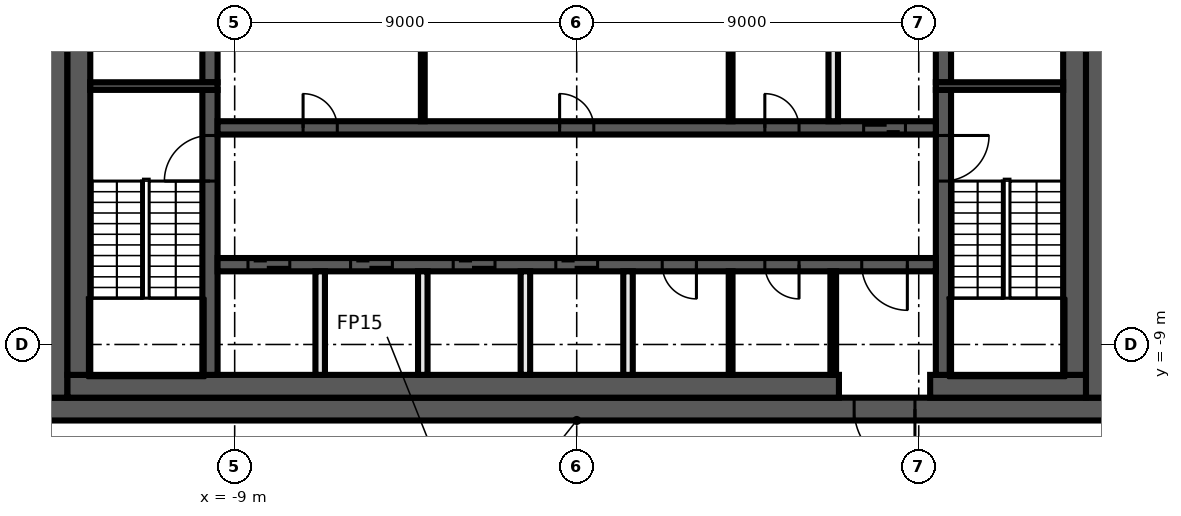
"""IFC4 building model, lengths in metres.
Left out: names, types, materials, properties, quantities, classifications, styles, units other than length and angle.
Written with IfcOpenShell. Run it as: python <this file> out.ifc"""

import sys

from ifc_helpers import new_model, si_unit, direction, frame, frame_2d, origin, place, context, subcontext, project, spatial, rectangle, extrude, element, fill, save


model = new_model("IFC4")
c1 = context("Model", 3, precision=1e-05, world=origin(), true_north=direction((0.0, 1.0)))
c2 = subcontext(c1, "Body", "Model", "MODEL_VIEW")
j1 = project(units=[si_unit("LENGTHUNIT", "METRE"), si_unit("PLANEANGLEUNIT", "RADIAN")], contexts=[c1])
p1 = place(None, origin())
s1 = spatial("IfcSite", under=j1, at=p1, CompositionType="ELEMENT")
p2 = place(p1, origin())
s2 = spatial("IfcBuilding", under=s1, at=p2, CompositionType="ELEMENT")
p3 = place(p2, frame((0.0, 0.0, 344.6)))
s3 = spatial("IfcBuildingStorey", under=s2, at=p3, CompositionType="ELEMENT", Elevation=344.6)
p4 = place(p3, frame((14.0, -10.7, 0.0), z_axis=(0.0, 0.0, 1.0), x_axis=(-1.0, 0.0, 0.0)))
e1 = element("IfcWall", 1, at=p4, inside=s3, PredefinedType="SHEAR", context=c2, shape_type="SweptSolid", body=[
    extrude(rectangle(XDim=28.0, YDim=0.6, at=frame_2d((14.0, 0.0))), origin(), (0.0, 0.0, 1.0), 3.82),
])
p5 = place(p4, frame((5.1, 0.0, 0.0)))
e2 = element("IfcOpeningElement", 2, at=p5, cuts=e1, PredefinedType="OPENING", context=c2, shape_type="SweptSolid", body=[
    extrude(rectangle(XDim=1.6, YDim=2.1, at=frame_2d((0.8, 1.05))), frame((0.0, 0.31, 0.0), z_axis=(0.0, -1.0, 0.0), x_axis=(1.0, 0.0, 0.0)), (0.0, 0.0, 1.0), 0.62),
])
for number, where, z_axis, x_axis in (
    (3, (13.7, 10.4, 0.0), (0.0, 0.0, 1.0), (0.0, -1.0, 0.0)),
    (4, (-13.7, -10.4, 0.0), (0.0, 0.0, 1.0), (0.0, 1.0, 0.0)),
):
    element("IfcWall", number, at=place(p3, frame(where, z_axis=z_axis, x_axis=x_axis)), inside=s3, PredefinedType="SHEAR", context=c2, shape_type="SweptSolid", body=[
        extrude(rectangle(XDim=20.8, YDim=0.6, at=frame_2d((10.4, 0.0))), origin(), (0.0, 0.0, 1.0), 3.82),
    ])
p6 = place(p3, frame((13.4, -10.1, 0.0), z_axis=(0.0, 0.0, 1.0), x_axis=(-1.0, 0.0, 0.0)))
e5 = element("IfcWall", 5, at=p6, inside=s3, PredefinedType="SHEAR", context=c2, shape_type="SweptSolid", body=[
    extrude(rectangle(XDim=4.1, YDim=0.6, at=frame_2d((2.05, 0.0))), origin(), (0.0, 0.0, 1.0), 3.82),
])
p7 = place(p3, frame((6.9, -10.1, 0.0), z_axis=(0.0, 0.0, 1.0), x_axis=(-1.0, 0.0, 0.0)))
e6 = element("IfcWall", 6, at=p7, inside=s3, PredefinedType="SHEAR", context=c2, shape_type="SweptSolid", body=[
    extrude(rectangle(XDim=20.3, YDim=0.6, at=frame_2d((10.15, 0.0))), origin(), (0.0, 0.0, 1.0), 3.82),
])
for number, where, z_axis, x_axis in (
    (7, (13.1, 9.8, 0.0), (0.0, 0.0, 1.0), (0.0, -1.0, 0.0)),
    (8, (-13.1, -9.8, 0.0), (0.0, 0.0, 1.0), (0.0, 1.0, 0.0)),
):
    element("IfcWall", number, at=place(p3, frame(where, z_axis=z_axis, x_axis=x_axis)), inside=s3, PredefinedType="SHEAR", context=c2, shape_type="SweptSolid", body=[
        extrude(rectangle(XDim=19.6, YDim=0.6, at=frame_2d((9.8, 0.0))), origin(), (0.0, 0.0, 1.0), 3.82),
    ])
p8 = place(p3, frame((9.65, -2.3, 0.0), z_axis=(0.0, 0.0, 1.0), x_axis=(0.0, -1.0, 0.0)))
e9 = element("IfcWall", 9, at=p8, inside=s3, PredefinedType="SHEAR", context=c2, shape_type="SweptSolid", body=[
    extrude(rectangle(XDim=7.5, YDim=0.4, at=frame_2d((3.75, 0.0))), origin(), (0.0, 0.0, 1.0), 3.82),
])
p9 = place(p8, frame((1.2, 0.0, 0.0)))
e10 = element("IfcOpeningElement", 10, at=p9, cuts=e9, PredefinedType="OPENING", context=c2, shape_type="SweptSolid", body=[
    extrude(rectangle(XDim=1.2, YDim=2.1, at=frame_2d((0.6, 1.05))), frame((0.0, 0.21, 0.0), z_axis=(0.0, -1.0, 0.0), x_axis=(1.0, 0.0, 0.0)), (0.0, 0.0, 1.0), 0.42),
])
p10 = place(p3, frame((9.65, 2.1, 0.0), z_axis=(0.0, 0.0, 1.0), x_axis=(0.0, -1.0, 0.0)))
e11 = element("IfcWall", 11, at=p10, inside=s3, PredefinedType="SHEAR", context=c2, shape_type="SweptSolid", body=[
    extrude(rectangle(XDim=4.2, YDim=0.4, at=frame_2d((2.1, 0.0))), origin(), (0.0, 0.0, 1.0), 3.82),
])
p11 = place(p10, frame((0.15, 0.0, 0.0)))
e12 = element("IfcOpeningElement", 12, at=p11, cuts=e11, PredefinedType="OPENING", context=c2, shape_type="SweptSolid", body=[
    extrude(rectangle(XDim=0.9, YDim=2.1, at=frame_2d((0.45, 1.05))), frame((0.0, 0.21, 0.0), z_axis=(0.0, -1.0, 0.0), x_axis=(1.0, 0.0, 0.0)), (0.0, 0.0, 1.0), 0.42),
])
p12 = place(p3, frame((-9.65, -9.8, 0.0), z_axis=(0.0, 0.0, 1.0), x_axis=(0.0, 1.0, 0.0)))
e13 = element("IfcWall", 13, at=p12, inside=s3, PredefinedType="SHEAR", context=c2, shape_type="SweptSolid", body=[
    extrude(rectangle(XDim=7.5, YDim=0.4, at=frame_2d((3.75, 0.0))), origin(), (0.0, 0.0, 1.0), 3.82),
])
p13 = place(p12, frame((5.1, 0.0, 0.0)))
e14 = element("IfcOpeningElement", 14, at=p13, cuts=e13, PredefinedType="OPENING", context=c2, shape_type="SweptSolid", body=[
    extrude(rectangle(XDim=1.2, YDim=2.1, at=frame_2d((0.6, 1.05))), frame((0.0, 0.21, 0.0), z_axis=(0.0, -1.0, 0.0), x_axis=(1.0, 0.0, 0.0)), (0.0, 0.0, 1.0), 0.42),
])
p14 = place(p3, frame((-9.65, -2.1, 0.0), z_axis=(0.0, 0.0, 1.0), x_axis=(0.0, 1.0, 0.0)))
e15 = element("IfcWall", 15, at=p14, inside=s3, PredefinedType="SHEAR", context=c2, shape_type="SweptSolid", body=[
    extrude(rectangle(XDim=4.2, YDim=0.4, at=frame_2d((2.1, 0.0))), origin(), (0.0, 0.0, 1.0), 3.82),
])
for number, where, z_axis, x_axis in (
    (16, (9.45, -2.2, 0.0), (0.0, 0.0, 1.0), (1.0, 0.0, 0.0)),
    (17, (-9.45, -2.2, 0.0), (0.0, 0.0, 1.0), (-1.0, 0.0, 0.0)),
):
    element("IfcWall", number, at=place(p3, frame(where, z_axis=z_axis, x_axis=x_axis)), inside=s3, PredefinedType="SHEAR", context=c2, shape_type="SweptSolid", body=[
        extrude(rectangle(XDim=3.35, YDim=0.2, at=frame_2d((1.675, 0.0))), origin(), (0.0, 0.0, 1.0), 3.82),
    ])
p15 = place(p3, frame((-9.45, -3.3, 0.0), z_axis=(0.0, 0.0, 1.0), x_axis=(1.0, 0.0, 0.0)))
e18 = element("IfcWall", 18, at=p15, inside=s3, PredefinedType="SHEAR", context=c2, shape_type="SweptSolid", body=[
    extrude(rectangle(XDim=18.9, YDim=0.35, at=frame_2d((9.45, 0.0))), origin(), (0.0, 0.0, 1.0), 3.82),
])
p16 = place(p15, frame((17.0, 0.0, 0.0)))
e19 = element("IfcOpeningElement", 19, at=p16, cuts=e18, PredefinedType="OPENING", context=c2, shape_type="SweptSolid", body=[
    extrude(rectangle(XDim=1.1, YDim=2.1, at=frame_2d((0.55, 1.05))), frame((0.0, 0.185, 0.0), z_axis=(0.0, -1.0, 0.0), x_axis=(1.0, 0.0, 0.0)), (0.0, 0.0, 1.0), 0.37),
])
p17 = place(p15, frame((2.25, 0.0, 0.0)))
e20 = element("IfcOpeningElement", 20, at=p17, cuts=e18, PredefinedType="OPENING", context=c2, shape_type="SweptSolid", body=[
    extrude(rectangle(XDim=0.9, YDim=2.1, at=frame_2d((0.45, 1.05))), frame((0.0, 0.185, 0.0), z_axis=(0.0, -1.0, 0.0), x_axis=(1.0, 0.0, 0.0)), (0.0, 0.0, 1.0), 0.37),
])
p18 = place(p15, frame((9.0, 0.0, 0.0)))
e21 = element("IfcOpeningElement", 21, at=p18, cuts=e18, PredefinedType="OPENING", context=c2, shape_type="SweptSolid", body=[
    extrude(rectangle(XDim=0.9, YDim=2.1, at=frame_2d((0.45, 1.05))), frame((0.0, 0.185, 0.0), z_axis=(0.0, -1.0, 0.0), x_axis=(1.0, 0.0, 0.0)), (0.0, 0.0, 1.0), 0.37),
])
p19 = place(p15, frame((14.4, 0.0, 0.0)))
e22 = element("IfcOpeningElement", 22, at=p19, cuts=e18, PredefinedType="OPENING", context=c2, shape_type="SweptSolid", body=[
    extrude(rectangle(XDim=0.9, YDim=2.1, at=frame_2d((0.45, 1.05))), frame((0.0, 0.185, 0.0), z_axis=(0.0, -1.0, 0.0), x_axis=(1.0, 0.0, 0.0)), (0.0, 0.0, 1.0), 0.37),
])
p20 = place(p3, frame((9.45, -6.9, 0.0), z_axis=(0.0, 0.0, 1.0), x_axis=(-1.0, 0.0, 0.0)))
e23 = element("IfcWall", 23, at=p20, inside=s3, PredefinedType="SHEAR", context=c2, shape_type="SweptSolid", body=[
    extrude(rectangle(XDim=18.9, YDim=0.35, at=frame_2d((9.45, 0.0))), origin(), (0.0, 0.0, 1.0), 3.82),
])
p21 = place(p20, frame((17.0, 0.0, 0.0)))
e24 = element("IfcOpeningElement", 24, at=p21, cuts=e23, PredefinedType="OPENING", context=c2, shape_type="SweptSolid", body=[
    extrude(rectangle(XDim=1.1, YDim=2.1, at=frame_2d((0.55, 1.05))), frame((0.0, 0.185, 0.0), z_axis=(0.0, -1.0, 0.0), x_axis=(1.0, 0.0, 0.0)), (0.0, 0.0, 1.0), 0.37),
])
p22 = place(p20, frame((14.3, 0.0, 0.0)))
e25 = element("IfcOpeningElement", 25, at=p22, cuts=e23, PredefinedType="OPENING", context=c2, shape_type="SweptSolid", body=[
    extrude(rectangle(XDim=1.1, YDim=2.1, at=frame_2d((0.55, 1.05))), frame((0.0, 0.185, 0.0), z_axis=(0.0, -1.0, 0.0), x_axis=(1.0, 0.0, 0.0)), (0.0, 0.0, 1.0), 0.37),
])
p23 = place(p20, frame((11.6, 0.0, 0.0)))
e26 = element("IfcOpeningElement", 26, at=p23, cuts=e23, PredefinedType="OPENING", context=c2, shape_type="SweptSolid", body=[
    extrude(rectangle(XDim=1.1, YDim=2.1, at=frame_2d((0.55, 1.05))), frame((0.0, 0.185, 0.0), z_axis=(0.0, -1.0, 0.0), x_axis=(1.0, 0.0, 0.0)), (0.0, 0.0, 1.0), 0.37),
])
p24 = place(p20, frame((8.9, 0.0, 0.0)))
e27 = element("IfcOpeningElement", 27, at=p24, cuts=e23, PredefinedType="OPENING", context=c2, shape_type="SweptSolid", body=[
    extrude(rectangle(XDim=1.1, YDim=2.1, at=frame_2d((0.55, 1.05))), frame((0.0, 0.185, 0.0), z_axis=(0.0, -1.0, 0.0), x_axis=(1.0, 0.0, 0.0)), (0.0, 0.0, 1.0), 0.37),
])
p25 = place(p20, frame((0.75, 0.0, 0.0)))
e28 = element("IfcOpeningElement", 28, at=p25, cuts=e23, PredefinedType="OPENING", context=c2, shape_type="SweptSolid", body=[
    extrude(rectangle(XDim=1.2, YDim=2.1, at=frame_2d((0.6, 1.05))), frame((0.0, 0.185, 0.0), z_axis=(0.0, -1.0, 0.0), x_axis=(1.0, 0.0, 0.0)), (0.0, 0.0, 1.0), 0.37),
])
p26 = place(p20, frame((6.3, 0.0, 0.0)))
e29 = element("IfcOpeningElement", 29, at=p26, cuts=e23, PredefinedType="OPENING", context=c2, shape_type="SweptSolid", body=[
    extrude(rectangle(XDim=0.9, YDim=2.1, at=frame_2d((0.45, 1.05))), frame((0.0, 0.185, 0.0), z_axis=(0.0, -1.0, 0.0), x_axis=(1.0, 0.0, 0.0)), (0.0, 0.0, 1.0), 0.37),
])
p27 = place(p20, frame((3.6, 0.0, 0.0)))
e30 = element("IfcOpeningElement", 30, at=p27, cuts=e23, PredefinedType="OPENING", context=c2, shape_type="SweptSolid", body=[
    extrude(rectangle(XDim=0.9, YDim=2.1, at=frame_2d((0.45, 1.05))), frame((0.0, 0.185, 0.0), z_axis=(0.0, -1.0, 0.0), x_axis=(1.0, 0.0, 0.0)), (0.0, 0.0, 1.0), 0.37),
])
p28 = place(p3, frame((6.75, -9.8, 0.0), z_axis=(0.0, 0.0, 1.0), x_axis=(0.0, 1.0, 0.0)))
e31 = element("IfcWall", 31, at=p28, inside=s3, PredefinedType="PARTITIONING", context=c2, shape_type="SweptSolid", body=[
    extrude(rectangle(XDim=2.725, YDim=0.15, at=frame_2d((1.363, 0.0))), origin(), (0.0, 0.0, 1.0), 3.82),
])
p29 = place(p3, frame((6.75, -3.125, 0.0), z_axis=(0.0, 0.0, 1.0), x_axis=(0.0, 1.0, 0.0)))
e32 = element("IfcWall", 32, at=p29, inside=s3, PredefinedType="SOLIDWALL", context=c2, shape_type="SweptSolid", body=[
    extrude(rectangle(XDim=2.725, YDim=0.25, at=frame_2d((1.363, 0.0))), origin(), (0.0, 0.0, 1.0), 3.82),
])
for number, where, z_axis, x_axis in (
    (33, (4.05, -9.8, 0.0), (0.0, 0.0, 1.0), (0.0, 1.0, 0.0)),
    (34, (4.05, -3.125, 0.0), (0.0, 0.0, 1.0), (0.0, 1.0, 0.0)),
):
    element("IfcWall", number, at=place(p3, frame(where, z_axis=z_axis, x_axis=x_axis)), inside=s3, PredefinedType="PARTITIONING", context=c2, shape_type="SweptSolid", body=[
        extrude(rectangle(XDim=2.725, YDim=0.1, at=frame_2d((1.363, 0.0))), origin(), (0.0, 0.0, 1.0), 3.82),
    ])
for number, where, z_axis, x_axis in (
    (35, (1.35, -9.8, 0.0), (0.0, 0.0, 1.0), (0.0, 1.0, 0.0)),
    (36, (-1.35, -9.8, 0.0), (0.0, 0.0, 1.0), (0.0, 1.0, 0.0)),
):
    element("IfcWall", number, at=place(p3, frame(where, z_axis=z_axis, x_axis=x_axis)), inside=s3, PredefinedType="SOLIDWALL", context=c2, shape_type="SweptSolid", body=[
        extrude(rectangle(XDim=2.725, YDim=0.25, at=frame_2d((1.363, 0.0))), origin(), (0.0, 0.0, 1.0), 3.82),
    ])
p30 = place(p3, frame((-4.05, -3.125, 0.0), z_axis=(0.0, 0.0, 1.0), x_axis=(0.0, 1.0, 0.0)))
e37 = element("IfcWall", 37, at=p30, inside=s3, PredefinedType="PARTITIONING", context=c2, shape_type="SweptSolid", body=[
    extrude(rectangle(XDim=2.725, YDim=0.1, at=frame_2d((1.363, 0.0))), origin(), (0.0, 0.0, 1.0), 3.82),
])
for number, where, z_axis, x_axis in (
    (38, (-4.05, -9.8, 0.0), (0.0, 0.0, 1.0), (0.0, 1.0, 0.0)),
    (39, (-6.75, -9.8, 0.0), (0.0, 0.0, 1.0), (0.0, 1.0, 0.0)),
):
    element("IfcWall", number, at=place(p3, frame(where, z_axis=z_axis, x_axis=x_axis)), inside=s3, PredefinedType="SOLIDWALL", context=c2, shape_type="SweptSolid", body=[
        extrude(rectangle(XDim=2.725, YDim=0.25, at=frame_2d((1.363, 0.0))), origin(), (0.0, 0.0, 1.0), 3.82),
    ])
p31 = place(p16, origin())
e40 = element("IfcDoor", 40, at=p31, inside=s3, OperationType="DOUBLE_DOOR_SLIDING", PredefinedType="DOOR", context=c2, shape_type="SweptSolid", body=[
    extrude(rectangle(XDim=1.1, YDim=2.1, at=frame_2d((0.55, 1.05))), frame((0.0, 0.025, 0.0), z_axis=(0.0, -1.0, 0.0), x_axis=(1.0, 0.0, 0.0)), (0.0, 0.0, 1.0), 0.05),
])
fill(e19, e40)
p32 = place(p21, origin())
e41 = element("IfcDoor", 41, at=p32, inside=s3, OperationType="DOUBLE_DOOR_SLIDING", PredefinedType="DOOR", context=c2, shape_type="SweptSolid", body=[
    extrude(rectangle(XDim=1.1, YDim=2.1, at=frame_2d((0.55, 1.05))), frame((0.0, 0.025, 0.0), z_axis=(0.0, -1.0, 0.0), x_axis=(1.0, 0.0, 0.0)), (0.0, 0.0, 1.0), 0.05),
])
fill(e24, e41)
p33 = place(p22, origin())
e42 = element("IfcDoor", 42, at=p33, inside=s3, OperationType="DOUBLE_DOOR_SLIDING", PredefinedType="DOOR", context=c2, shape_type="SweptSolid", body=[
    extrude(rectangle(XDim=1.1, YDim=2.1, at=frame_2d((0.55, 1.05))), frame((0.0, 0.025, 0.0), z_axis=(0.0, -1.0, 0.0), x_axis=(1.0, 0.0, 0.0)), (0.0, 0.0, 1.0), 0.05),
])
fill(e25, e42)
p34 = place(p23, origin())
e43 = element("IfcDoor", 43, at=p34, inside=s3, OperationType="DOUBLE_DOOR_SLIDING", PredefinedType="DOOR", context=c2, shape_type="SweptSolid", body=[
    extrude(rectangle(XDim=1.1, YDim=2.1, at=frame_2d((0.55, 1.05))), frame((0.0, 0.025, 0.0), z_axis=(0.0, -1.0, 0.0), x_axis=(1.0, 0.0, 0.0)), (0.0, 0.0, 1.0), 0.05),
])
fill(e26, e43)
p35 = place(p24, origin())
e44 = element("IfcDoor", 44, at=p35, inside=s3, OperationType="DOUBLE_DOOR_SLIDING", PredefinedType="DOOR", context=c2, shape_type="SweptSolid", body=[
    extrude(rectangle(XDim=1.1, YDim=2.1, at=frame_2d((0.55, 1.05))), frame((0.0, 0.025, 0.0), z_axis=(0.0, -1.0, 0.0), x_axis=(1.0, 0.0, 0.0)), (0.0, 0.0, 1.0), 0.05),
])
fill(e27, e44)
p36 = place(p5, origin())
e45 = element("IfcDoor", 45, at=p36, inside=s3, OperationType="DOUBLE_DOOR_SINGLE_SWING", PredefinedType="DOOR", context=c2, shape_type="SweptSolid", body=[
    extrude(rectangle(XDim=1.6, YDim=2.1, at=frame_2d((0.8, 1.05))), frame((0.0, 0.025, 0.0), z_axis=(0.0, -1.0, 0.0), x_axis=(1.0, 0.0, 0.0)), (0.0, 0.0, 1.0), 0.05),
])
fill(e2, e45)
p37 = place(p25, origin())
e46 = element("IfcDoor", 46, at=p37, inside=s3, OperationType="SINGLE_SWING_LEFT", PredefinedType="DOOR", context=c2, shape_type="SweptSolid", body=[
    extrude(rectangle(XDim=1.2, YDim=2.1, at=frame_2d((0.6, 1.05))), frame((0.0, 0.025, 0.0), z_axis=(0.0, -1.0, 0.0), x_axis=(1.0, 0.0, 0.0)), (0.0, 0.0, 1.0), 0.05),
])
fill(e28, e46)
p38 = place(p17, origin())
e47 = element("IfcDoor", 47, at=p38, inside=s3, OperationType="SINGLE_SWING_LEFT", PredefinedType="DOOR", context=c2, shape_type="SweptSolid", body=[
    extrude(rectangle(XDim=0.9, YDim=2.1, at=frame_2d((0.45, 1.05))), frame((0.0, 0.025, 0.0), z_axis=(0.0, -1.0, 0.0), x_axis=(1.0, 0.0, 0.0)), (0.0, 0.0, 1.0), 0.05),
])
fill(e20, e47)
p39 = place(p18, origin())
e48 = element("IfcDoor", 48, at=p39, inside=s3, OperationType="SINGLE_SWING_RIGHT", PredefinedType="DOOR", context=c2, shape_type="SweptSolid", body=[
    extrude(rectangle(XDim=0.9, YDim=2.1, at=frame_2d((0.45, 1.05))), frame((0.0, 0.025, 0.0), z_axis=(0.0, -1.0, 0.0), x_axis=(1.0, 0.0, 0.0)), (0.0, 0.0, 1.0), 0.05),
])
fill(e21, e48)
p40 = place(p19, origin())
e49 = element("IfcDoor", 49, at=p40, inside=s3, OperationType="SINGLE_SWING_LEFT", PredefinedType="DOOR", context=c2, shape_type="SweptSolid", body=[
    extrude(rectangle(XDim=0.9, YDim=2.1, at=frame_2d((0.45, 1.05))), frame((0.0, 0.025, 0.0), z_axis=(0.0, -1.0, 0.0), x_axis=(1.0, 0.0, 0.0)), (0.0, 0.0, 1.0), 0.05),
])
fill(e22, e49)
p41 = place(p26, origin())
e50 = element("IfcDoor", 50, at=p41, inside=s3, OperationType="SINGLE_SWING_RIGHT", PredefinedType="DOOR", context=c2, shape_type="SweptSolid", body=[
    extrude(rectangle(XDim=0.9, YDim=2.1, at=frame_2d((0.45, 1.05))), frame((0.0, 0.025, 0.0), z_axis=(0.0, -1.0, 0.0), x_axis=(1.0, 0.0, 0.0)), (0.0, 0.0, 1.0), 0.05),
])
fill(e29, e50)
p42 = place(p27, origin())
e51 = element("IfcDoor", 51, at=p42, inside=s3, OperationType="SINGLE_SWING_LEFT", PredefinedType="DOOR", context=c2, shape_type="SweptSolid", body=[
    extrude(rectangle(XDim=0.9, YDim=2.1, at=frame_2d((0.45, 1.05))), frame((0.0, 0.025, 0.0), z_axis=(0.0, -1.0, 0.0), x_axis=(1.0, 0.0, 0.0)), (0.0, 0.0, 1.0), 0.05),
])
fill(e30, e51)
p43 = place(p9, origin())
e52 = element("IfcDoor", 52, at=p43, inside=s3, OperationType="SINGLE_SWING_RIGHT", PredefinedType="DOOR", context=c2, shape_type="SweptSolid", body=[
    extrude(rectangle(XDim=1.2, YDim=2.1, at=frame_2d((0.6, 1.05))), frame((0.0, 0.025, 0.0), z_axis=(0.0, -1.0, 0.0), x_axis=(1.0, 0.0, 0.0)), (0.0, 0.0, 1.0), 0.05),
])
fill(e10, e52)
p44 = place(p13, origin())
e53 = element("IfcDoor", 53, at=p44, inside=s3, OperationType="SINGLE_SWING_LEFT", PredefinedType="DOOR", context=c2, shape_type="SweptSolid", body=[
    extrude(rectangle(XDim=1.2, YDim=2.1, at=frame_2d((0.6, 1.05))), frame((0.0, 0.025, 0.0), z_axis=(0.0, -1.0, 0.0), x_axis=(1.0, 0.0, 0.0)), (0.0, 0.0, 1.0), 0.05),
])
fill(e14, e53)
save(model, sys.argv[1])
